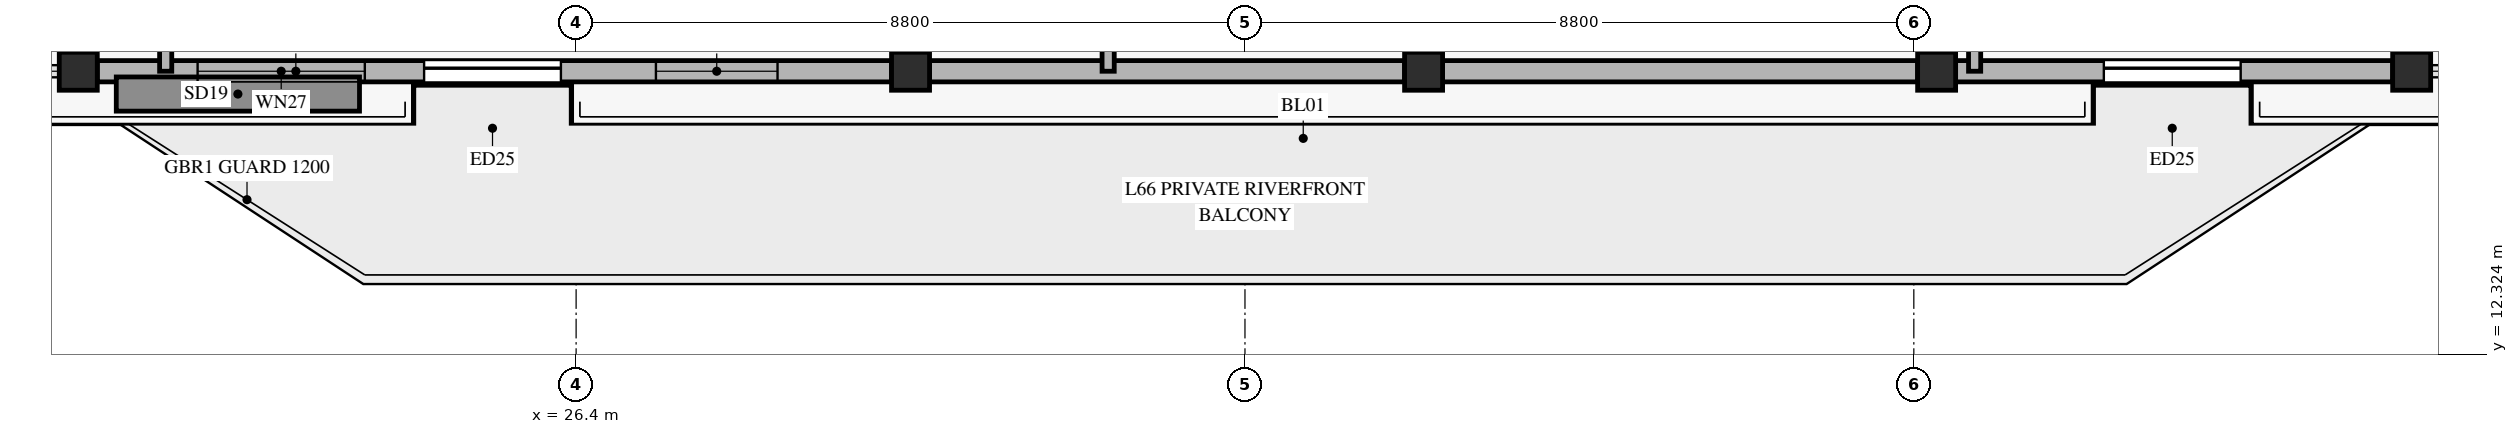
"""IFC4 building model, lengths in metres.
Left out: names, types, materials, properties, quantities, classifications, styles, units other than length and angle.
Written with IfcOpenShell. Run it as: python <this file> out.ifc"""

import sys

from ifc_helpers import new_model, si_unit, direction, frame, frame_2d, origin, origin_2d, place, context, subcontext, project, spatial, rectangle, hollow_rectangle, extrude, source, transform, mapped, element, fill, save


model = new_model("IFC4")
c1 = context("Model", 3, precision=1e-05, world=origin(), true_north=direction((0.0, 1.0)))
c2 = subcontext(c1, "Body", "Model", "MODEL_VIEW")
j1 = project(units=[si_unit("LENGTHUNIT", "METRE"), si_unit("PLANEANGLEUNIT", "RADIAN")], contexts=[c1])
p1 = place(None, origin())
s1 = spatial("IfcSite", under=j1, at=p1, CompositionType="ELEMENT")
p2 = place(p1, origin())
s2 = spatial("IfcBuilding", under=s1, at=p2, CompositionType="ELEMENT")
p3 = place(p2, frame((0.0, 0.0, 258.7)))
s3 = spatial("IfcBuildingStorey", under=s2, at=p3, CompositionType="ELEMENT", Elevation=258.7)
m1 = source(origin(), c2, "Body", "SweptSolid", [
    extrude(hollow_rectangle(XDim=0.5, YDim=0.5, WallThickness=0.024, at=origin_2d()), origin(), (0.0, 0.0, 1.0), 3.185),
])
for number, where, z_axis, x_axis in (
    (1, (19.85, 16.045, 0.0), (0.0, 0.0, 1.0), (1.0, 0.0, 0.0)),
    (2, (30.8, 16.045, 0.0), (0.0, 0.0, 1.0), (1.0, 0.0, 0.0)),
    (3, (37.55, 16.045, 0.0), (0.0, 0.0, 1.0), (1.0, 0.0, 0.0)),
    (4, (44.3, 16.045, 0.0), (0.0, 0.0, 1.0), (1.0, 0.0, 0.0)),
    (5, (50.55, 16.045, 0.0), (0.0, 0.0, 1.0), (1.0, 0.0, 0.0)),
):
    element("IfcColumn", number, at=place(p3, frame(where, z_axis=z_axis, x_axis=x_axis)), inside=s3, PredefinedType="COLUMN", context=c2, shape_type="MappedRepresentation", body=[
        mapped(m1, transform((0.0, 0.0, 0.0), x_axis=(1.0, 0.0, 0.0), y_axis=(0.0, 1.0, 0.0), z_axis=(0.0, 0.0, 1.0), scale=1.0)),
    ])
p4 = place(p3, frame((20.1, 16.045, 0.0), z_axis=(0.0, 0.0, 1.0), x_axis=(1.0, 0.0, 0.0)))
e6 = element("IfcWall", 6, at=p4, inside=s3, PredefinedType="SOLIDWALL", context=c2, shape_type="SweptSolid", body=[
    extrude(rectangle(XDim=10.45, YDim=0.28, at=frame_2d((5.225, 0.0))), origin(), (0.0, 0.0, 1.0), 2.815),
])
p5 = place(p4, frame((4.3, 0.0, 0.0)))
e7 = element("IfcOpeningElement", 7, at=p5, cuts=e6, PredefinedType="OPENING", context=c2, shape_type="SweptSolid", body=[
    extrude(rectangle(XDim=1.8, YDim=2.25, at=frame_2d((0.9, 1.125))), frame((0.0, 0.15, 0.0), z_axis=(0.0, -1.0, 0.0), x_axis=(1.0, 0.0, 0.0)), (0.0, 0.0, 1.0), 0.3),
])
p6 = place(p4, frame((1.32, 0.0, 0.45)))
e8 = element("IfcOpeningElement", 8, at=p6, cuts=e6, PredefinedType="OPENING", context=c2, shape_type="SweptSolid", body=[
    extrude(rectangle(XDim=2.2, YDim=2.1, at=frame_2d((1.1, 1.05))), frame((0.0, 0.15, 0.0), z_axis=(0.0, -1.0, 0.0), x_axis=(1.0, 0.0, 0.0)), (0.0, 0.0, 1.0), 0.3),
])
p7 = place(p4, frame((7.35, 0.0, 0.45)))
e9 = element("IfcOpeningElement", 9, at=p7, cuts=e6, PredefinedType="OPENING", context=c2, shape_type="SweptSolid", body=[
    extrude(rectangle(XDim=1.6, YDim=2.0, at=frame_2d((0.8, 1.0))), frame((0.0, 0.15, 0.0), z_axis=(0.0, -1.0, 0.0), x_axis=(1.0, 0.0, 0.0)), (0.0, 0.0, 1.0), 0.3),
])
for number, where, z_axis, x_axis in (
    (10, (31.05, 16.045, 0.0), (0.0, 0.0, 1.0), (1.0, 0.0, 0.0)),
    (11, (37.8, 16.045, 0.0), (0.0, 0.0, 1.0), (1.0, 0.0, 0.0)),
):
    element("IfcWall", number, at=place(p3, frame(where, z_axis=z_axis, x_axis=x_axis)), inside=s3, PredefinedType="SOLIDWALL", context=c2, shape_type="SweptSolid", body=[
        extrude(rectangle(XDim=6.25, YDim=0.28, at=frame_2d((3.125, 0.0))), origin(), (0.0, 0.0, 1.0), 2.815),
    ])
p8 = place(p3, frame((44.55, 16.045, 0.0), z_axis=(0.0, 0.0, 1.0), x_axis=(1.0, 0.0, 0.0)))
e12 = element("IfcWall", 12, at=p8, inside=s3, PredefinedType="SOLIDWALL", context=c2, shape_type="SweptSolid", body=[
    extrude(rectangle(XDim=5.75, YDim=0.28, at=frame_2d((2.875, 0.0))), origin(), (0.0, 0.0, 1.0), 2.815),
])
p9 = place(p8, frame((1.95, 0.0, 0.0)))
e13 = element("IfcOpeningElement", 13, at=p9, cuts=e12, PredefinedType="OPENING", context=c2, shape_type="SweptSolid", body=[
    extrude(rectangle(XDim=1.8, YDim=2.25, at=frame_2d((0.9, 1.125))), frame((0.0, 0.15, 0.0), z_axis=(0.0, -1.0, 0.0), x_axis=(1.0, 0.0, 0.0)), (0.0, 0.0, 1.0), 0.3),
])
for number, where, z_axis, x_axis in (
    (14, (21.0, 16.045, 0.0), (0.0, 0.0, 1.0), (0.0, 1.0, 0.0)),
    (15, (33.4, 16.045, 0.0), (0.0, 0.0, 1.0), (0.0, 1.0, 0.0)),
    (16, (44.8, 16.045, 0.0), (0.0, 0.0, 1.0), (0.0, 1.0, 0.0)),
):
    element("IfcWall", number, at=place(p3, frame(where, z_axis=z_axis, x_axis=x_axis)), inside=s3, PredefinedType="PARTITIONING", context=c2, shape_type="SweptSolid", body=[
        extrude(rectangle(XDim=18.805, YDim=0.16, at=frame_2d((9.403, 0.0))), origin(), (0.0, 0.0, 1.0), 2.77),
    ])
m2 = source(origin(), c2, "Body", "SweptSolid", [
    extrude(rectangle(XDim=1.8, YDim=2.25, at=frame_2d((0.9, 1.125))), frame((0.0, 0.025, 0.0), z_axis=(0.0, -1.0, 0.0), x_axis=(1.0, 0.0, 0.0)), (0.0, 0.0, 1.0), 0.05),
])
p10 = place(p5, origin())
e17 = element("IfcDoor", 17, at=p10, inside=s3, OperationType="SLIDING_TO_LEFT", PredefinedType="DOOR", context=c2, shape_type="MappedRepresentation", body=[
    mapped(m2, transform((0.0, 0.0, 0.0), x_axis=(1.0, 0.0, 0.0), y_axis=(0.0, 1.0, 0.0), z_axis=(0.0, 0.0, 1.0), scale=1.0)),
])
fill(e7, e17)
m3 = source(origin(), c2, "Body", "SweptSolid", [
    extrude(rectangle(XDim=2.2, YDim=2.1, at=frame_2d((1.1, 1.05))), frame((0.0, 0.03, 0.0), z_axis=(0.0, -1.0, 0.0), x_axis=(1.0, 0.0, 0.0)), (0.0, 0.0, 1.0), 0.06),
])
p11 = place(p6, origin())
e18 = element("IfcWindow", 18, at=p11, inside=s3, PartitioningType="SINGLE_PANEL", PredefinedType="WINDOW", context=c2, shape_type="MappedRepresentation", body=[
    mapped(m3, transform((0.0, 0.0, 0.0), x_axis=(1.0, 0.0, 0.0), y_axis=(0.0, 1.0, 0.0), z_axis=(0.0, 0.0, 1.0), scale=1.0)),
])
fill(e8, e18)
m4 = source(origin(), c2, "Body", "SweptSolid", [
    extrude(rectangle(XDim=1.6, YDim=2.0, at=frame_2d((0.8, 1.0))), frame((0.0, 0.03, 0.0), z_axis=(0.0, -1.0, 0.0), x_axis=(1.0, 0.0, 0.0)), (0.0, 0.0, 1.0), 0.06),
])
p12 = place(p7, origin())
e19 = element("IfcWindow", 19, at=p12, inside=s3, PartitioningType="SINGLE_PANEL", PredefinedType="WINDOW", context=c2, shape_type="MappedRepresentation", body=[
    mapped(m4, transform((0.0, 0.0, 0.0), x_axis=(1.0, 0.0, 0.0), y_axis=(0.0, 1.0, 0.0), z_axis=(0.0, 0.0, 1.0), scale=1.0)),
])
fill(e9, e19)
p13 = place(p9, origin())
e20 = element("IfcDoor", 20, at=p13, inside=s3, OperationType="SLIDING_TO_LEFT", PredefinedType="DOOR", context=c2, shape_type="MappedRepresentation", body=[
    mapped(m2, transform((0.0, 0.0, 0.0), x_axis=(1.0, 0.0, 0.0), y_axis=(0.0, 1.0, 0.0), z_axis=(0.0, 0.0, 1.0), scale=1.0)),
])
fill(e13, e20)
save(model, sys.argv[1])
